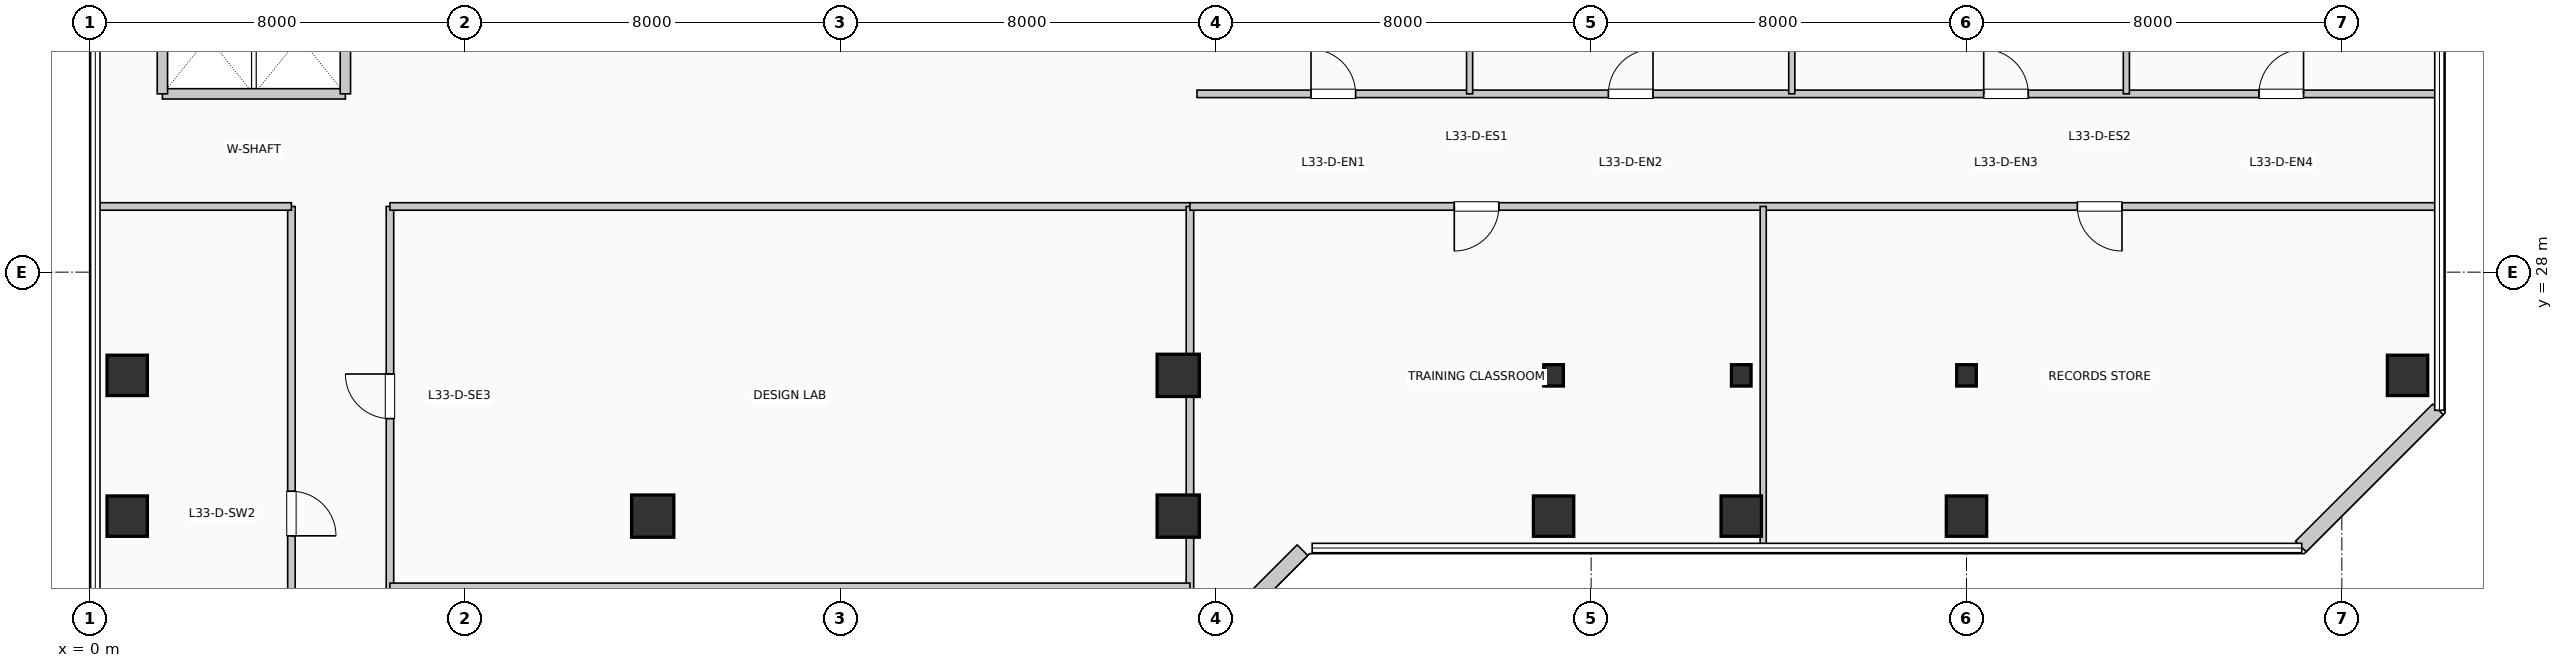
"""IFC4 building model, lengths in metres.
Left out: names, types, materials, properties, quantities, classifications, styles, units other than length and angle.
Written with IfcOpenShell. Run it as: python <this file> out.ifc"""

import sys

from ifc_helpers import new_model, si_unit, direction, frame, frame_2d, origin, origin_2d, place, context, subcontext, project, spatial, rectangle, i_section, extrude, element, fill, save


model = new_model("IFC4")
c1 = context("Model", 3, precision=1e-05, world=origin(), true_north=direction((0.0, 1.0)))
c2 = subcontext(c1, "Body", "Model", "MODEL_VIEW")
j1 = project(units=[si_unit("LENGTHUNIT", "METRE"), si_unit("PLANEANGLEUNIT", "RADIAN")], contexts=[c1])
p1 = place(None, origin())
s1 = spatial("IfcSite", under=j1, at=p1, CompositionType="ELEMENT")
p2 = place(p1, origin())
s2 = spatial("IfcBuilding", under=s1, at=p2, CompositionType="ELEMENT")
p3 = place(p2, frame((0.0, 0.0, 138.93)))
s3 = spatial("IfcBuildingStorey", under=s2, at=p3, CompositionType="ELEMENT", Elevation=138.93)
for number, where, z_axis, x_axis in (
    (1, (0.8, 22.8, 0.0), (0.0, 0.0, 1.0), (1.0, 0.0, 0.0)),
    (2, (0.8, 25.8, 0.0), (0.0, 0.0, 1.0), (1.0, 0.0, 0.0)),
):
    element("IfcColumn", number, at=place(p3, frame(where, z_axis=z_axis, x_axis=x_axis)), inside=s3, PredefinedType="COLUMN", context=c2, shape_type="SweptSolid", body=[
        extrude(rectangle(XDim=0.86, YDim=0.86, at=origin_2d()), origin(), (0.0, 0.0, 1.0), 3.96),
    ])
for number, where, z_axis, x_axis in (
    (3, (12.0, 22.8, 0.0), (0.0, 0.0, 1.0), (1.0, 0.0, 0.0)),
    (4, (23.2, 22.8, 0.0), (0.0, 0.0, 1.0), (1.0, 0.0, 0.0)),
    (5, (23.2, 25.8, 0.0), (0.0, 0.0, 1.0), (1.0, 0.0, 0.0)),
):
    element("IfcColumn", number, at=place(p3, frame(where, z_axis=z_axis, x_axis=x_axis)), inside=s3, PredefinedType="COLUMN", context=c2, shape_type="SweptSolid", body=[
        extrude(rectangle(XDim=0.9, YDim=0.9, at=origin_2d()), origin(), (0.0, 0.0, 1.0), 3.96),
    ])
p4 = place(p3, frame((31.2, 22.8, 0.0), z_axis=(0.0, 0.0, 1.0), x_axis=(1.0, 0.0, 0.0)))
e6 = element("IfcColumn", 6, at=p4, inside=s3, PredefinedType="COLUMN", context=c2, shape_type="SweptSolid", body=[
    extrude(rectangle(XDim=0.86, YDim=0.86, at=origin_2d()), origin(), (0.0, 0.0, 1.0), 3.96),
])
p5 = place(p3, frame((31.2, 25.8, 0.0), z_axis=(0.0, 0.0, 1.0), x_axis=(1.0, 0.0, 0.0)))
e7 = element("IfcColumn", 7, at=p5, inside=s3, PredefinedType="COLUMN", context=c2, shape_type="SweptSolid", body=[
    extrude(i_section(OverallWidth=0.418, OverallDepth=0.455, WebThickness=0.032, FlangeThickness=0.051, at=origin_2d()), origin(), (0.0, 0.0, 1.0), 3.96),
])
p6 = place(p3, frame((35.2, 22.8, 0.0), z_axis=(0.0, 0.0, 1.0), x_axis=(1.0, 0.0, 0.0)))
e8 = element("IfcColumn", 8, at=p6, inside=s3, PredefinedType="COLUMN", context=c2, shape_type="SweptSolid", body=[
    extrude(rectangle(XDim=0.86, YDim=0.86, at=origin_2d()), origin(), (0.0, 0.0, 1.0), 3.96),
])
p7 = place(p3, frame((35.2, 25.8, 0.0), z_axis=(0.0, 0.0, 1.0), x_axis=(1.0, 0.0, 0.0)))
e9 = element("IfcColumn", 9, at=p7, inside=s3, PredefinedType="COLUMN", context=c2, shape_type="SweptSolid", body=[
    extrude(i_section(OverallWidth=0.418, OverallDepth=0.455, WebThickness=0.032, FlangeThickness=0.051, at=origin_2d()), origin(), (0.0, 0.0, 1.0), 3.96),
])
p8 = place(p3, frame((40.0, 22.8, 0.0), z_axis=(0.0, 0.0, 1.0), x_axis=(1.0, 0.0, 0.0)))
e10 = element("IfcColumn", 10, at=p8, inside=s3, PredefinedType="COLUMN", context=c2, shape_type="SweptSolid", body=[
    extrude(rectangle(XDim=0.86, YDim=0.86, at=origin_2d()), origin(), (0.0, 0.0, 1.0), 3.96),
])
p9 = place(p3, frame((40.0, 25.8, 0.0), z_axis=(0.0, 0.0, 1.0), x_axis=(1.0, 0.0, 0.0)))
e11 = element("IfcColumn", 11, at=p9, inside=s3, PredefinedType="COLUMN", context=c2, shape_type="SweptSolid", body=[
    extrude(i_section(OverallWidth=0.418, OverallDepth=0.455, WebThickness=0.032, FlangeThickness=0.051, at=origin_2d()), origin(), (0.0, 0.0, 1.0), 3.96),
])
p10 = place(p3, frame((49.4, 25.8, 0.0), z_axis=(0.0, 0.0, 1.0), x_axis=(1.0, 0.0, 0.0)))
e12 = element("IfcColumn", 12, at=p10, inside=s3, PredefinedType="COLUMN", context=c2, shape_type="SweptSolid", body=[
    extrude(rectangle(XDim=0.86, YDim=0.86, at=origin_2d()), origin(), (0.0, 0.0, 1.0), 3.96),
])
p11 = place(p3, frame((23.926, 20.152, 0.0), z_axis=(0.0, 0.0, 1.0), x_axis=(0.707106781187, 0.707106781187, 0.0)))
e13 = element("IfcWall", 13, at=p11, inside=s3, PredefinedType="SOLIDWALL", context=c2, shape_type="SweptSolid", body=[
    extrude(rectangle(XDim=2.718, YDim=0.32, at=frame_2d((1.359, 0.0))), origin(), (0.0, 0.0, 1.0), 3.71),
])
p12 = place(p3, frame((47.126, 22.152, 0.0), z_axis=(0.0, 0.0, 1.0), x_axis=(0.707136318428, 0.707077242712, 0.0)))
e14 = element("IfcWall", 14, at=p12, inside=s3, PredefinedType="SOLIDWALL", context=c2, shape_type="SweptSolid", body=[
    extrude(rectangle(XDim=4.133, YDim=0.32, at=frame_2d((2.066, 0.0))), origin(), (0.0, 0.0, 1.0), 3.71),
])
p13 = place(p3, frame((1.55, 31.8, 0.0), z_axis=(0.0, 0.0, 1.0), x_axis=(1.0, 0.0, 0.0)))
e15 = element("IfcWall", 15, at=p13, inside=s3, PredefinedType="PARTITIONING", context=c2, shape_type="SweptSolid", body=[
    extrude(rectangle(XDim=3.9, YDim=0.22, at=frame_2d((1.95, 0.0))), origin(), (0.0, 0.0, 1.0), 3.71),
])
for number, where, z_axis, x_axis in (
    (16, (1.55, 31.8, 0.0), (0.0, 0.0, 1.0), (0.0, 1.0, 0.0)),
    (17, (5.45, 31.8, 0.0), (0.0, 0.0, 1.0), (0.0, 1.0, 0.0)),
):
    element("IfcWall", number, at=place(p3, frame(where, z_axis=z_axis, x_axis=x_axis)), inside=s3, PredefinedType="PARTITIONING", context=c2, shape_type="SweptSolid", body=[
        extrude(rectangle(XDim=2.38, YDim=0.22, at=frame_2d((1.19, 0.0))), origin(), (0.0, 0.0, 1.0), 3.71),
    ])
p14 = place(p3, frame((4.3, 5.6, 0.0), z_axis=(0.0, 0.0, 1.0), x_axis=(0.0, 1.0, 0.0)))
e18 = element("IfcWall", 18, at=p14, inside=s3, PredefinedType="PARTITIONING", context=c2, shape_type="SweptSolid", body=[
    extrude(rectangle(XDim=23.8, YDim=0.16, at=frame_2d((11.9, 0.0))), origin(), (0.0, 0.0, 1.0), 3.71),
])
p15 = place(p14, frame((5.83, 0.0, 0.0), z_axis=(0.0, 0.0, 1.0), x_axis=(-1.0, 0.0, 0.0)))
e19 = element("IfcOpeningElement", 19, at=p15, cuts=e18, PredefinedType="OPENING", context=c2, shape_type="SweptSolid", body=[
    extrude(rectangle(XDim=0.95, YDim=2.15, at=frame_2d((0.475, 1.075))), frame((0.0, 0.09, 0.0), z_axis=(0.0, -1.0, 0.0), x_axis=(1.0, 0.0, 0.0)), (0.0, 0.0, 1.0), 0.18),
])
p16 = place(p14, frame((17.73, 0.0, 0.0), z_axis=(0.0, 0.0, 1.0), x_axis=(-1.0, 0.0, 0.0)))
e20 = element("IfcOpeningElement", 20, at=p16, cuts=e18, PredefinedType="OPENING", context=c2, shape_type="SweptSolid", body=[
    extrude(rectangle(XDim=0.95, YDim=2.15, at=frame_2d((0.475, 1.075))), frame((0.0, 0.09, 0.0), z_axis=(0.0, -1.0, 0.0), x_axis=(1.0, 0.0, 0.0)), (0.0, 0.0, 1.0), 0.18),
])
p17 = place(p3, frame((6.4, 5.6, 0.0), z_axis=(0.0, 0.0, 1.0), x_axis=(0.0, 1.0, 0.0)))
e21 = element("IfcWall", 21, at=p17, inside=s3, PredefinedType="PARTITIONING", context=c2, shape_type="SweptSolid", body=[
    extrude(rectangle(XDim=23.8, YDim=0.16, at=frame_2d((11.9, 0.0))), origin(), (0.0, 0.0, 1.0), 3.71),
])
p18 = place(p17, frame((3.333, 0.0, 0.0)))
e22 = element("IfcOpeningElement", 22, at=p18, cuts=e21, PredefinedType="OPENING", context=c2, shape_type="SweptSolid", body=[
    extrude(rectangle(XDim=0.95, YDim=2.15, at=frame_2d((0.475, 1.075))), frame((0.0, 0.09, 0.0), z_axis=(0.0, -1.0, 0.0), x_axis=(1.0, 0.0, 0.0)), (0.0, 0.0, 1.0), 0.18),
])
p19 = place(p17, frame((11.187, 0.0, 0.0)))
e23 = element("IfcOpeningElement", 23, at=p19, cuts=e21, PredefinedType="OPENING", context=c2, shape_type="SweptSolid", body=[
    extrude(rectangle(XDim=0.95, YDim=2.15, at=frame_2d((0.475, 1.075))), frame((0.0, 0.09, 0.0), z_axis=(0.0, -1.0, 0.0), x_axis=(1.0, 0.0, 0.0)), (0.0, 0.0, 1.0), 0.18),
])
p20 = place(p17, frame((19.279, 0.0, 0.0)))
e24 = element("IfcOpeningElement", 24, at=p20, cuts=e21, PredefinedType="OPENING", context=c2, shape_type="SweptSolid", body=[
    extrude(rectangle(XDim=0.95, YDim=2.15, at=frame_2d((0.475, 1.075))), frame((0.0, 0.09, 0.0), z_axis=(0.0, -1.0, 0.0), x_axis=(1.0, 0.0, 0.0)), (0.0, 0.0, 1.0), 0.18),
])
p21 = place(p3, frame((0.19, 29.4, 0.0), z_axis=(0.0, 0.0, 1.0), x_axis=(1.0, 0.0, 0.0)))
e25 = element("IfcWall", 25, at=p21, inside=s3, PredefinedType="PARTITIONING", context=c2, shape_type="SweptSolid", body=[
    extrude(rectangle(XDim=4.11, YDim=0.16, at=frame_2d((2.055, 0.0))), origin(), (0.0, 0.0, 1.0), 3.365),
])
p22 = place(p3, frame((6.4, 29.4, 0.0), z_axis=(0.0, 0.0, 1.0), x_axis=(1.0, 0.0, 0.0)))
e26 = element("IfcWall", 26, at=p22, inside=s3, PredefinedType="PARTITIONING", context=c2, shape_type="SweptSolid", body=[
    extrude(rectangle(XDim=17.05, YDim=0.16, at=frame_2d((8.525, 0.0))), origin(), (0.0, 0.0, 1.0), 3.365),
])
p23 = place(p3, frame((23.45, 0.19, 0.0), z_axis=(0.0, 0.0, 1.0), x_axis=(0.0, 1.0, 0.0)))
e27 = element("IfcWall", 27, at=p23, inside=s3, PredefinedType="PARTITIONING", context=c2, shape_type="SweptSolid", body=[
    extrude(rectangle(XDim=29.21, YDim=0.16, at=frame_2d((14.605, 0.0))), origin(), (0.0, 0.0, 1.0), 3.045),
])
p24 = place(p3, frame((6.4, 21.308, 0.0), z_axis=(0.0, 0.0, 1.0), x_axis=(1.0, 0.0, 0.0)))
e28 = element("IfcWall", 28, at=p24, inside=s3, PredefinedType="PARTITIONING", context=c2, shape_type="SweptSolid", body=[
    extrude(rectangle(XDim=17.05, YDim=0.13, at=frame_2d((8.525, 0.0))), origin(), (0.0, 0.0, 1.0), 3.71),
])
p25 = place(p3, frame((23.45, 29.4, 0.0), z_axis=(0.0, 0.0, 1.0), x_axis=(1.0, 0.0, 0.0)))
e29 = element("IfcWall", 29, at=p25, inside=s3, PredefinedType="PARTITIONING", context=c2, shape_type="SweptSolid", body=[
    extrude(rectangle(XDim=26.56, YDim=0.16, at=frame_2d((13.28, 0.0))), origin(), (0.0, 0.0, 1.0), 3.365),
])
p26 = place(p25, frame((6.584, 0.0, 0.0), z_axis=(0.0, 0.0, 1.0), x_axis=(-1.0, 0.0, 0.0)))
e30 = element("IfcOpeningElement", 30, at=p26, cuts=e29, PredefinedType="OPENING", context=c2, shape_type="SweptSolid", body=[
    extrude(rectangle(XDim=0.95, YDim=2.15, at=frame_2d((0.475, 1.075))), frame((0.0, 0.09, 0.0), z_axis=(0.0, -1.0, 0.0), x_axis=(1.0, 0.0, 0.0)), (0.0, 0.0, 1.0), 0.18),
])
p27 = place(p25, frame((19.864, 0.0, 0.0), z_axis=(0.0, 0.0, 1.0), x_axis=(-1.0, 0.0, 0.0)))
e31 = element("IfcOpeningElement", 31, at=p27, cuts=e29, PredefinedType="OPENING", context=c2, shape_type="SweptSolid", body=[
    extrude(rectangle(XDim=0.95, YDim=2.15, at=frame_2d((0.475, 1.075))), frame((0.0, 0.09, 0.0), z_axis=(0.0, -1.0, 0.0), x_axis=(1.0, 0.0, 0.0)), (0.0, 0.0, 1.0), 0.18),
])
p28 = place(p3, frame((23.6, 31.8, 0.0), z_axis=(0.0, 0.0, 1.0), x_axis=(1.0, 0.0, 0.0)))
e32 = element("IfcWall", 32, at=p28, inside=s3, PredefinedType="PARTITIONING", context=c2, shape_type="SweptSolid", body=[
    extrude(rectangle(XDim=26.41, YDim=0.16, at=frame_2d((13.205, 0.0))), origin(), (0.0, 0.0, 1.0), 3.71),
])
p29 = place(p28, frame((2.43, 0.0, 0.0)))
e33 = element("IfcOpeningElement", 33, at=p29, cuts=e32, PredefinedType="OPENING", context=c2, shape_type="SweptSolid", body=[
    extrude(rectangle(XDim=0.95, YDim=2.15, at=frame_2d((0.475, 1.075))), frame((0.0, 0.09, 0.0), z_axis=(0.0, -1.0, 0.0), x_axis=(1.0, 0.0, 0.0)), (0.0, 0.0, 1.0), 0.18),
])
p30 = place(p28, frame((8.769, 0.0, 0.0)))
e34 = element("IfcOpeningElement", 34, at=p30, cuts=e32, PredefinedType="OPENING", context=c2, shape_type="SweptSolid", body=[
    extrude(rectangle(XDim=0.95, YDim=2.15, at=frame_2d((0.475, 1.075))), frame((0.0, 0.09, 0.0), z_axis=(0.0, -1.0, 0.0), x_axis=(1.0, 0.0, 0.0)), (0.0, 0.0, 1.0), 0.18),
])
p31 = place(p28, frame((16.767, 0.0, 0.0)))
e35 = element("IfcOpeningElement", 35, at=p31, cuts=e32, PredefinedType="OPENING", context=c2, shape_type="SweptSolid", body=[
    extrude(rectangle(XDim=0.95, YDim=2.15, at=frame_2d((0.475, 1.075))), frame((0.0, 0.09, 0.0), z_axis=(0.0, -1.0, 0.0), x_axis=(1.0, 0.0, 0.0)), (0.0, 0.0, 1.0), 0.18),
])
p32 = place(p28, frame((22.634, 0.0, 0.0)))
e36 = element("IfcOpeningElement", 36, at=p32, cuts=e32, PredefinedType="OPENING", context=c2, shape_type="SweptSolid", body=[
    extrude(rectangle(XDim=0.95, YDim=2.15, at=frame_2d((0.475, 1.075))), frame((0.0, 0.09, 0.0), z_axis=(0.0, -1.0, 0.0), x_axis=(1.0, 0.0, 0.0)), (0.0, 0.0, 1.0), 0.18),
])
p33 = place(p3, frame((35.667, 22.19, 0.0), z_axis=(0.0, 0.0, 1.0), x_axis=(0.0, 1.0, 0.0)))
e37 = element("IfcWall", 37, at=p33, inside=s3, PredefinedType="PARTITIONING", context=c2, shape_type="SweptSolid", body=[
    extrude(rectangle(XDim=7.21, YDim=0.13, at=frame_2d((3.605, 0.0))), origin(), (0.0, 0.0, 1.0), 3.045),
])
for number, where, z_axis, x_axis in (
    (38, (29.41, 31.8, 0.0), (0.0, 0.0, 1.0), (0.0, 1.0, 0.0)),
    (39, (36.277, 31.8, 0.0), (0.0, 0.0, 1.0), (0.0, 1.0, 0.0)),
    (40, (43.407, 31.8, 0.0), (0.0, 0.0, 1.0), (0.0, 1.0, 0.0)),
):
    element("IfcWall", number, at=place(p3, frame(where, z_axis=z_axis, x_axis=x_axis)), inside=s3, PredefinedType="PARTITIONING", context=c2, shape_type="SweptSolid", body=[
        extrude(rectangle(XDim=14.01, YDim=0.13, at=frame_2d((7.005, 0.0))), origin(), (0.0, 0.0, 1.0), 3.71),
    ])
p34 = place(p16, origin())
e41 = element("IfcDoor", 41, at=p34, inside=s3, OperationType="SINGLE_SWING_LEFT", PredefinedType="DOOR", context=c2, shape_type="SweptSolid", body=[
    extrude(rectangle(XDim=0.95, YDim=2.15, at=frame_2d((0.475, 1.075))), frame((0.0, 0.025, 0.0), z_axis=(0.0, -1.0, 0.0), x_axis=(1.0, 0.0, 0.0)), (0.0, 0.0, 1.0), 0.05),
])
fill(e20, e41)
p35 = place(p20, origin())
e42 = element("IfcDoor", 42, at=p35, inside=s3, OperationType="SINGLE_SWING_RIGHT", PredefinedType="DOOR", context=c2, shape_type="SweptSolid", body=[
    extrude(rectangle(XDim=0.95, YDim=2.15, at=frame_2d((0.475, 1.075))), frame((0.0, 0.025, 0.0), z_axis=(0.0, -1.0, 0.0), x_axis=(1.0, 0.0, 0.0)), (0.0, 0.0, 1.0), 0.05),
])
fill(e24, e42)
p36 = place(p26, origin())
e43 = element("IfcDoor", 43, at=p36, inside=s3, OperationType="SINGLE_SWING_LEFT", PredefinedType="DOOR", context=c2, shape_type="SweptSolid", body=[
    extrude(rectangle(XDim=0.95, YDim=2.15, at=frame_2d((0.475, 1.075))), frame((0.0, 0.025, 0.0), z_axis=(0.0, -1.0, 0.0), x_axis=(1.0, 0.0, 0.0)), (0.0, 0.0, 1.0), 0.05),
])
fill(e30, e43)
p37 = place(p27, origin())
e44 = element("IfcDoor", 44, at=p37, inside=s3, OperationType="SINGLE_SWING_RIGHT", PredefinedType="DOOR", context=c2, shape_type="SweptSolid", body=[
    extrude(rectangle(XDim=0.95, YDim=2.15, at=frame_2d((0.475, 1.075))), frame((0.0, 0.025, 0.0), z_axis=(0.0, -1.0, 0.0), x_axis=(1.0, 0.0, 0.0)), (0.0, 0.0, 1.0), 0.05),
])
fill(e31, e44)
p38 = place(p29, origin())
e45 = element("IfcDoor", 45, at=p38, inside=s3, OperationType="SINGLE_SWING_LEFT", PredefinedType="DOOR", context=c2, shape_type="SweptSolid", body=[
    extrude(rectangle(XDim=0.95, YDim=2.15, at=frame_2d((0.475, 1.075))), frame((0.0, 0.025, 0.0), z_axis=(0.0, -1.0, 0.0), x_axis=(1.0, 0.0, 0.0)), (0.0, 0.0, 1.0), 0.05),
])
fill(e33, e45)
p39 = place(p30, origin())
e46 = element("IfcDoor", 46, at=p39, inside=s3, OperationType="SINGLE_SWING_RIGHT", PredefinedType="DOOR", context=c2, shape_type="SweptSolid", body=[
    extrude(rectangle(XDim=0.95, YDim=2.15, at=frame_2d((0.475, 1.075))), frame((0.0, 0.025, 0.0), z_axis=(0.0, -1.0, 0.0), x_axis=(1.0, 0.0, 0.0)), (0.0, 0.0, 1.0), 0.05),
])
fill(e34, e46)
p40 = place(p31, origin())
e47 = element("IfcDoor", 47, at=p40, inside=s3, OperationType="SINGLE_SWING_LEFT", PredefinedType="DOOR", context=c2, shape_type="SweptSolid", body=[
    extrude(rectangle(XDim=0.95, YDim=2.15, at=frame_2d((0.475, 1.075))), frame((0.0, 0.025, 0.0), z_axis=(0.0, -1.0, 0.0), x_axis=(1.0, 0.0, 0.0)), (0.0, 0.0, 1.0), 0.05),
])
fill(e35, e47)
p41 = place(p32, origin())
e48 = element("IfcDoor", 48, at=p41, inside=s3, OperationType="SINGLE_SWING_RIGHT", PredefinedType="DOOR", context=c2, shape_type="SweptSolid", body=[
    extrude(rectangle(XDim=0.95, YDim=2.15, at=frame_2d((0.475, 1.075))), frame((0.0, 0.025, 0.0), z_axis=(0.0, -1.0, 0.0), x_axis=(1.0, 0.0, 0.0)), (0.0, 0.0, 1.0), 0.05),
])
fill(e36, e48)
save(model, sys.argv[1])
